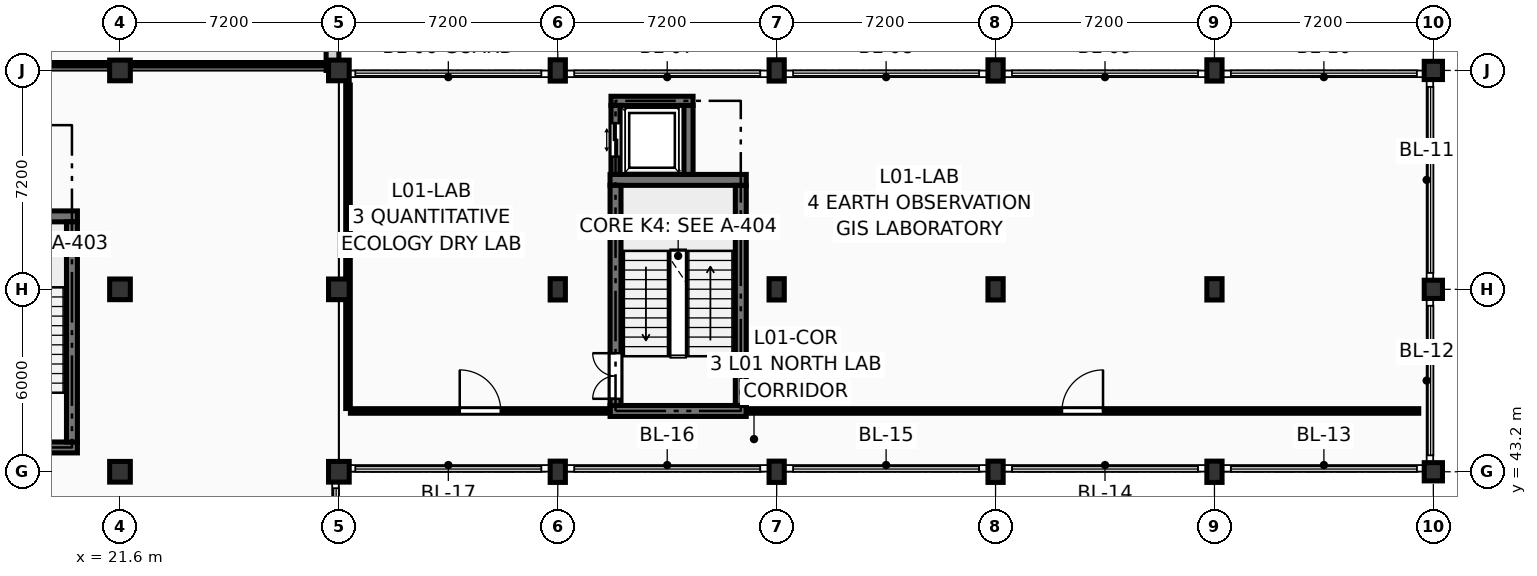
"""IFC4 building model, lengths in metres.
Left out: names, types, materials, properties, quantities, classifications, styles, units other than length and angle.
Written with IfcOpenShell. Run it as: python <this file> out.ifc"""

import sys

from ifc_helpers import new_model, si_unit, direction, frame, frame_2d, origin, origin_2d, place, context, subcontext, project, spatial, rectangle, extrude, element, fill, save


model = new_model("IFC4")
c1 = context("Model", 3, precision=1e-05, world=origin(), true_north=direction((0.0, 1.0)))
c2 = subcontext(c1, "Body", "Model", "MODEL_VIEW")
j1 = project(units=[si_unit("LENGTHUNIT", "METRE"), si_unit("PLANEANGLEUNIT", "RADIAN")], contexts=[c1])
p1 = place(None, origin())
s1 = spatial("IfcSite", under=j1, at=p1, CompositionType="ELEMENT")
p2 = place(p1, origin())
s2 = spatial("IfcBuilding", under=s1, at=p2, CompositionType="ELEMENT")
p3 = place(p2, frame((0.0, 0.0, 4.5)))
s3 = spatial("IfcBuildingStorey", under=s2, at=p3, CompositionType="ELEMENT", Elevation=4.5)
for number, where, z_axis, x_axis in (
    (1, (21.6, 43.2, 0.0), (0.0, 0.0, 1.0), (1.0, 0.0, 0.0)),
    (2, (21.6, 49.2, 0.0), (0.0, 0.0, 1.0), (1.0, 0.0, 0.0)),
    (3, (21.6, 56.4, 0.0), (0.0, 0.0, 1.0), (1.0, 0.0, 0.0)),
    (4, (28.8, 43.2, 0.0), (0.0, 0.0, 1.0), (1.0, 0.0, 0.0)),
    (5, (28.8, 49.2, 0.0), (0.0, 0.0, 1.0), (1.0, 0.0, 0.0)),
    (6, (28.8, 56.4, 0.0), (0.0, 0.0, 1.0), (1.0, 0.0, 0.0)),
):
    element("IfcColumn", number, at=place(p3, frame(where, z_axis=z_axis, x_axis=x_axis)), inside=s3, PredefinedType="COLUMN", context=c2, shape_type="SweptSolid", body=[
        extrude(rectangle(XDim=0.68, YDim=0.68, at=origin_2d()), origin(), (0.0, 0.0, 1.0), 4.05),
    ])
for number, where, z_axis, x_axis in (
    (7, (36.0, 43.2, 0.0), (0.0, 0.0, 1.0), (1.0, 0.0, 0.0)),
    (8, (36.0, 49.2, 0.0), (0.0, 0.0, 1.0), (1.0, 0.0, 0.0)),
    (9, (36.0, 56.4, 0.0), (0.0, 0.0, 1.0), (1.0, 0.0, 0.0)),
    (10, (43.2, 43.2, 0.0), (0.0, 0.0, 1.0), (1.0, 0.0, 0.0)),
    (11, (43.2, 49.2, 0.0), (0.0, 0.0, 1.0), (1.0, 0.0, 0.0)),
    (12, (43.2, 56.4, 0.0), (0.0, 0.0, 1.0), (1.0, 0.0, 0.0)),
    (13, (50.4, 43.2, 0.0), (0.0, 0.0, 1.0), (1.0, 0.0, 0.0)),
    (14, (50.4, 49.2, 0.0), (0.0, 0.0, 1.0), (1.0, 0.0, 0.0)),
    (15, (50.4, 56.4, 0.0), (0.0, 0.0, 1.0), (1.0, 0.0, 0.0)),
    (16, (57.6, 43.2, 0.0), (0.0, 0.0, 1.0), (1.0, 0.0, 0.0)),
    (17, (57.6, 49.2, 0.0), (0.0, 0.0, 1.0), (1.0, 0.0, 0.0)),
    (18, (57.6, 56.4, 0.0), (0.0, 0.0, 1.0), (1.0, 0.0, 0.0)),
):
    element("IfcColumn", number, at=place(p3, frame(where, z_axis=z_axis, x_axis=x_axis)), inside=s3, PredefinedType="COLUMN", context=c2, shape_type="SweptSolid", body=[
        extrude(rectangle(XDim=0.5, YDim=0.7, at=origin_2d()), origin(), (0.0, 0.0, 1.0), 4.05),
    ])
for number, where, z_axis, x_axis in (
    (19, (64.8, 43.2, 0.0), (0.0, 0.0, 1.0), (1.0, 0.0, 0.0)),
    (20, (64.8, 49.2, 0.0), (0.0, 0.0, 1.0), (1.0, 0.0, 0.0)),
    (21, (64.8, 56.4, 0.0), (0.0, 0.0, 1.0), (1.0, 0.0, 0.0)),
):
    element("IfcColumn", number, at=place(p3, frame(where, z_axis=z_axis, x_axis=x_axis)), inside=s3, PredefinedType="COLUMN", context=c2, shape_type="SweptSolid", body=[
        extrude(rectangle(XDim=0.6, YDim=0.6, at=origin_2d()), origin(), (0.0, 0.0, 1.0), 4.05),
    ])
p4 = place(p3, frame((28.59, 56.4, 0.0), z_axis=(0.0, 0.0, 1.0), x_axis=(0.0, 1.0, 0.0)))
e22 = element("IfcWall", 22, at=p4, inside=s3, PredefinedType="SOLIDWALL", context=c2, shape_type="SweptSolid", body=[
    extrude(rectangle(XDim=7.2, YDim=0.42, at=frame_2d((3.6, 0.0))), origin(), (0.0, 0.0, 1.0), 3.16),
])
p5 = place(p4, frame((1.717, 0.0, 0.45)))
e23 = element("IfcOpeningElement", 23, at=p5, cuts=e22, PredefinedType="OPENING", context=c2, shape_type="SweptSolid", body=[
    extrude(rectangle(XDim=1.4, YDim=2.38, at=frame_2d((0.7, 1.19))), frame((0.0, 0.222, 0.0), z_axis=(0.0, -1.0, 0.0), x_axis=(1.0, 0.0, 0.0)), (0.0, 0.0, 1.0), 0.444),
])
p6 = place(p4, frame((4.083, 0.0, 0.45)))
e24 = element("IfcOpeningElement", 24, at=p6, cuts=e22, PredefinedType="OPENING", context=c2, shape_type="SweptSolid", body=[
    extrude(rectangle(XDim=1.4, YDim=2.38, at=frame_2d((0.7, 1.19))), frame((0.0, 0.222, 0.0), z_axis=(0.0, -1.0, 0.0), x_axis=(1.0, 0.0, 0.0)), (0.0, 0.0, 1.0), 0.444),
])
for number, where, z_axis, x_axis in (
    (25, (15.72, 44.0, 0.0), (0.0, 0.0, 1.0), (1.0, 0.0, 0.0)),
    (26, (15.72, 51.6, 0.0), (0.0, 0.0, 1.0), (1.0, 0.0, 0.0)),
):
    element("IfcWall", number, at=place(p3, frame(where, z_axis=z_axis, x_axis=x_axis)), inside=s3, PredefinedType="SHEAR", context=c2, shape_type="SweptSolid", body=[
        extrude(rectangle(XDim=4.48, YDim=0.36, at=frame_2d((2.24, 0.0))), origin(), (0.0, 0.0, 1.0), 3.79),
    ])
p7 = place(p3, frame((20.02, 44.18, 0.0), z_axis=(0.0, 0.0, 1.0), x_axis=(0.0, 1.0, 0.0)))
e27 = element("IfcWall", 27, at=p7, inside=s3, PredefinedType="SHEAR", context=c2, shape_type="SweptSolid", body=[
    extrude(rectangle(XDim=7.24, YDim=0.36, at=frame_2d((3.62, 0.0))), origin(), (0.0, 0.0, 1.0), 3.79),
])
for number, where, z_axis, x_axis in (
    (28, (37.72, 45.2, 0.0), (0.0, 0.0, 1.0), (1.0, 0.0, 0.0)),
    (29, (37.72, 52.8, 0.0), (0.0, 0.0, 1.0), (1.0, 0.0, 0.0)),
):
    element("IfcWall", number, at=place(p3, frame(where, z_axis=z_axis, x_axis=x_axis)), inside=s3, PredefinedType="SHEAR", context=c2, shape_type="SweptSolid", body=[
        extrude(rectangle(XDim=4.48, YDim=0.36, at=frame_2d((2.24, 0.0))), origin(), (0.0, 0.0, 1.0), 3.79),
    ])
p8 = place(p3, frame((37.9, 45.38, 0.0), z_axis=(0.0, 0.0, 1.0), x_axis=(0.0, 1.0, 0.0)))
e30 = element("IfcWall", 30, at=p8, inside=s3, PredefinedType="SHEAR", context=c2, shape_type="SweptSolid", body=[
    extrude(rectangle(XDim=7.24, YDim=0.36, at=frame_2d((3.62, 0.0))), origin(), (0.0, 0.0, 1.0), 3.79),
])
p9 = place(p8, frame((0.22, 0.0, 0.0)))
e31 = element("IfcOpeningElement", 31, at=p9, cuts=e30, PredefinedType="OPENING", context=c2, shape_type="SweptSolid", body=[
    extrude(rectangle(XDim=1.5, YDim=2.2, at=frame_2d((0.75, 1.1))), frame((0.0, 0.192, 0.0), z_axis=(0.0, -1.0, 0.0), x_axis=(1.0, 0.0, 0.0)), (0.0, 0.0, 1.0), 0.384),
])
p10 = place(p3, frame((42.02, 45.38, 0.0), z_axis=(0.0, 0.0, 1.0), x_axis=(0.0, 1.0, 0.0)))
e32 = element("IfcWall", 32, at=p10, inside=s3, PredefinedType="SHEAR", context=c2, shape_type="SweptSolid", body=[
    extrude(rectangle(XDim=7.24, YDim=0.36, at=frame_2d((3.62, 0.0))), origin(), (0.0, 0.0, 1.0), 3.79),
])
p11 = place(p3, frame((37.75, 55.4, 0.0), z_axis=(0.0, 0.0, 1.0), x_axis=(1.0, 0.0, 0.0)))
e33 = element("IfcWall", 33, at=p11, inside=s3, PredefinedType="SHEAR", context=c2, shape_type="SweptSolid", body=[
    extrude(rectangle(XDim=2.7, YDim=0.3, at=frame_2d((1.35, 0.0))), origin(), (0.0, 0.0, 1.0), 3.79),
])
p12 = place(p3, frame((37.9, 52.98, 0.0), z_axis=(0.0, 0.0, 1.0), x_axis=(0.0, 1.0, 0.0)))
e34 = element("IfcWall", 34, at=p12, inside=s3, PredefinedType="SHEAR", context=c2, shape_type="SweptSolid", body=[
    extrude(rectangle(XDim=2.27, YDim=0.3, at=frame_2d((1.135, 0.0))), origin(), (0.0, 0.0, 1.0), 3.79),
])
p13 = place(p12, frame((0.585, 0.0, 0.0)))
e35 = element("IfcOpeningElement", 35, at=p13, cuts=e34, PredefinedType="OPENING", context=c2, shape_type="SweptSolid", body=[
    extrude(rectangle(XDim=1.1, YDim=2.2, at=frame_2d((0.55, 1.1))), frame((0.0, 0.162, 0.0), z_axis=(0.0, -1.0, 0.0), x_axis=(1.0, 0.0, 0.0)), (0.0, 0.0, 1.0), 0.324),
])
p14 = place(p3, frame((40.3, 52.98, 0.0), z_axis=(0.0, 0.0, 1.0), x_axis=(0.0, 1.0, 0.0)))
e36 = element("IfcWall", 36, at=p14, inside=s3, PredefinedType="SHEAR", context=c2, shape_type="SweptSolid", body=[
    extrude(rectangle(XDim=2.27, YDim=0.3, at=frame_2d((1.135, 0.0))), origin(), (0.0, 0.0, 1.0), 3.79),
])
p15 = place(p3, frame((29.1, 45.28, 0.0), z_axis=(0.0, 0.0, 1.0), x_axis=(0.0, 1.0, 0.0)))
e37 = element("IfcWall", 37, at=p15, inside=s3, PredefinedType="PARTITIONING", context=c2, shape_type="SweptSolid", body=[
    extrude(rectangle(XDim=10.64, YDim=0.15, at=frame_2d((5.32, 0.0))), origin(), (0.0, 0.0, 1.0), 2.925),
])
p16 = place(p3, frame((29.18, 45.2, 0.0), z_axis=(0.0, 0.0, 1.0), x_axis=(1.0, 0.0, 0.0)))
e38 = element("IfcWall", 38, at=p16, inside=s3, PredefinedType="PARTITIONING", context=c2, shape_type="SweptSolid", body=[
    extrude(rectangle(XDim=8.54, YDim=0.15, at=frame_2d((4.27, 0.0))), origin(), (0.0, 0.0, 1.0), 3.775),
])
p17 = place(p16, frame((3.595, 0.0, 0.0)))
e39 = element("IfcOpeningElement", 39, at=p17, cuts=e38, PredefinedType="OPENING", context=c2, shape_type="SweptSolid", body=[
    extrude(rectangle(XDim=1.35, YDim=2.2, at=frame_2d((0.675, 1.1))), frame((0.0, 0.087, 0.0), z_axis=(0.0, -1.0, 0.0), x_axis=(1.0, 0.0, 0.0)), (0.0, 0.0, 1.0), 0.174),
])
p18 = place(p3, frame((42.2, 45.2, 0.0), z_axis=(0.0, 0.0, 1.0), x_axis=(1.0, 0.0, 0.0)))
e40 = element("IfcWall", 40, at=p18, inside=s3, PredefinedType="PARTITIONING", context=c2, shape_type="SweptSolid", body=[
    extrude(rectangle(XDim=22.12, YDim=0.15, at=frame_2d((11.06, 0.0))), origin(), (0.0, 0.0, 1.0), 3.775),
])
p19 = place(p18, frame((10.385, 0.0, 0.0)))
e41 = element("IfcOpeningElement", 41, at=p19, cuts=e40, PredefinedType="OPENING", context=c2, shape_type="SweptSolid", body=[
    extrude(rectangle(XDim=1.35, YDim=2.2, at=frame_2d((0.675, 1.1))), frame((0.0, 0.087, 0.0), z_axis=(0.0, -1.0, 0.0), x_axis=(1.0, 0.0, 0.0)), (0.0, 0.0, 1.0), 0.174),
])
p20 = place(p3, frame((16.08, 56.6, 0.0), z_axis=(0.0, 0.0, 1.0), x_axis=(1.0, 0.0, 0.0)))
e42 = element("IfcWall", 42, at=p20, inside=s3, PredefinedType="PARTITIONING", context=c2, shape_type="SweptSolid", body=[
    extrude(rectangle(XDim=12.24, YDim=0.12, at=frame_2d((6.12, 0.0))), origin(), (0.0, 0.0, 1.0), 3.025),
])
p21 = place(p9, origin())
e43 = element("IfcDoor", 43, at=p21, inside=s3, OperationType="DOUBLE_DOOR_SINGLE_SWING", PredefinedType="DOOR", context=c2, shape_type="SweptSolid", body=[
    extrude(rectangle(XDim=1.5, YDim=2.2, at=frame_2d((0.75, 1.1))), frame((0.0, 0.025, 0.0), z_axis=(0.0, -1.0, 0.0), x_axis=(1.0, 0.0, 0.0)), (0.0, 0.0, 1.0), 0.05),
])
fill(e31, e43)
p22 = place(p13, origin())
e44 = element("IfcDoor", 44, at=p22, inside=s3, OperationType="DOUBLE_DOOR_SLIDING", PredefinedType="DOOR", context=c2, shape_type="SweptSolid", body=[
    extrude(rectangle(XDim=1.1, YDim=2.2, at=frame_2d((0.55, 1.1))), frame((0.0, 0.025, 0.0), z_axis=(0.0, -1.0, 0.0), x_axis=(1.0, 0.0, 0.0)), (0.0, 0.0, 1.0), 0.05),
])
fill(e35, e44)
p23 = place(p17, origin())
e45 = element("IfcDoor", 45, at=p23, inside=s3, OperationType="SINGLE_SWING_LEFT", PredefinedType="DOOR", context=c2, shape_type="SweptSolid", body=[
    extrude(rectangle(XDim=1.35, YDim=2.2, at=frame_2d((0.675, 1.1))), frame((0.0, 0.025, 0.0), z_axis=(0.0, -1.0, 0.0), x_axis=(1.0, 0.0, 0.0)), (0.0, 0.0, 1.0), 0.05),
])
fill(e39, e45)
p24 = place(p19, origin())
e46 = element("IfcDoor", 46, at=p24, inside=s3, OperationType="SINGLE_SWING_RIGHT", PredefinedType="DOOR", context=c2, shape_type="SweptSolid", body=[
    extrude(rectangle(XDim=1.35, YDim=2.2, at=frame_2d((0.675, 1.1))), frame((0.0, 0.025, 0.0), z_axis=(0.0, -1.0, 0.0), x_axis=(1.0, 0.0, 0.0)), (0.0, 0.0, 1.0), 0.05),
])
fill(e41, e46)
save(model, sys.argv[1])
